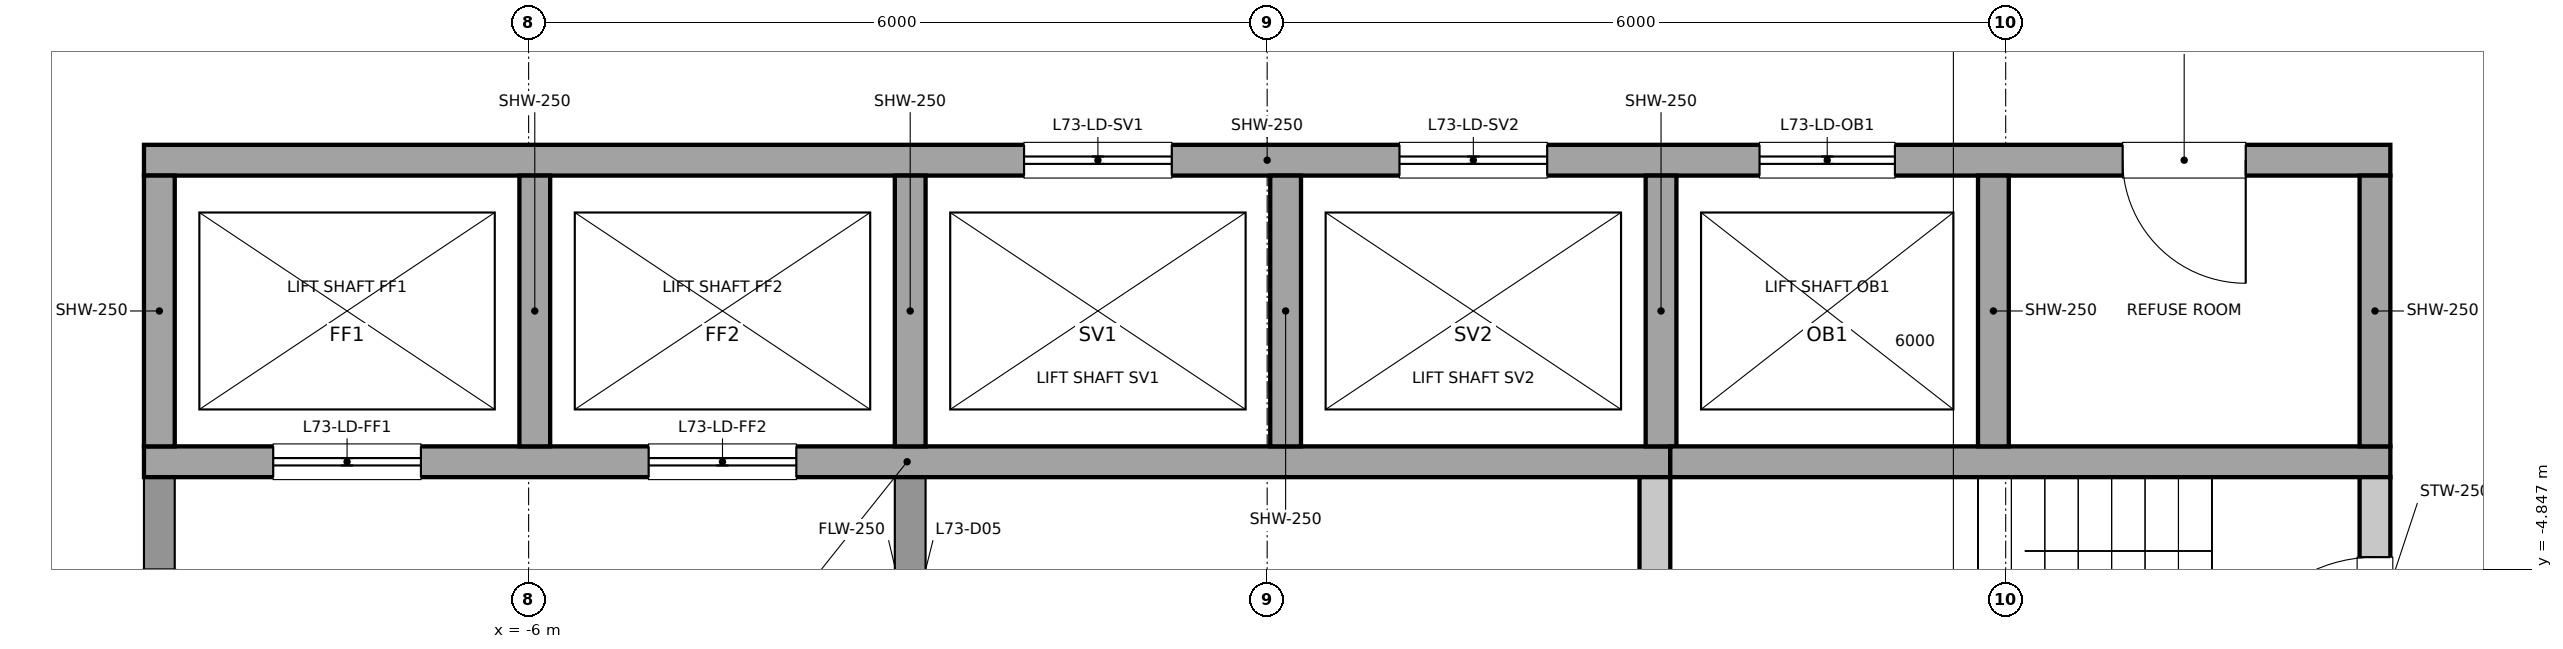
"""IFC4 building model, lengths in metres.
Left out: names, types, materials, properties, quantities, classifications, styles, units other than length and angle.
Written with IfcOpenShell. Run it as: python <this file> out.ifc"""

import sys

from ifc_helpers import new_model, si_unit, direction, frame, frame_2d, origin, place, context, subcontext, project, spatial, rectangle, extrude, element, fill, save


model = new_model("IFC4")
c1 = context("Model", 3, precision=1e-05, world=origin(), true_north=direction((0.0, 1.0)))
c2 = subcontext(c1, "Body", "Model", "MODEL_VIEW")
j1 = project(units=[si_unit("LENGTHUNIT", "METRE"), si_unit("PLANEANGLEUNIT", "RADIAN")], contexts=[c1])
p1 = place(None, origin())
s1 = spatial("IfcSite", under=j1, at=p1, CompositionType="ELEMENT")
p2 = place(p1, origin())
s2 = spatial("IfcBuilding", under=s1, at=p2, CompositionType="ELEMENT")
p3 = place(p2, frame((0.0, 0.0, 329.8)))
s3 = spatial("IfcBuildingStorey", under=s2, at=p3, CompositionType="ELEMENT", Elevation=329.8)
p4 = place(p3, frame((9.0, -6.6, 0.0), z_axis=(0.0, 0.0, 1.0), x_axis=(0.0, 1.0, 0.0)))
e1 = element("IfcWall", 1, at=p4, inside=s3, PredefinedType="SOLIDWALL", context=c2, shape_type="SweptSolid", body=[
    extrude(rectangle(XDim=2.5, YDim=0.25, at=frame_2d((1.25, 0.0))), origin(), (0.0, 0.0, 1.0), 5.8),
])
p5 = place(p4, frame((0.65, 0.0, 0.0)))
e2 = element("IfcOpeningElement", 2, at=p5, cuts=e1, PredefinedType="OPENING", context=c2, shape_type="SweptSolid", body=[
    extrude(rectangle(XDim=1.2, YDim=2.1, at=frame_2d((0.6, 1.05))), frame((0.0, 0.125, 0.0), z_axis=(0.0, -1.0, 0.0), x_axis=(1.0, 0.0, 0.0)), (0.0, 0.0, 1.0), 0.25),
])
p6 = place(p3, frame((-9.0, -6.6, 0.0), z_axis=(0.0, 0.0, 1.0), x_axis=(0.0, 1.0, 0.0)))
e3 = element("IfcWall", 3, at=p6, inside=s3, PredefinedType="PARTITIONING", context=c2, shape_type="SweptSolid", body=[
    extrude(rectangle(XDim=2.5, YDim=0.25, at=frame_2d((1.25, 0.0))), origin(), (0.0, 0.0, 1.0), 5.8),
])
p7 = place(p6, frame((0.75, 0.0, 0.0)))
e4 = element("IfcOpeningElement", 4, at=p7, cuts=e3, PredefinedType="OPENING", context=c2, shape_type="SweptSolid", body=[
    extrude(rectangle(XDim=1.0, YDim=2.1, at=frame_2d((0.5, 1.05))), frame((0.0, 0.125, 0.0), z_axis=(0.0, -1.0, 0.0), x_axis=(1.0, 0.0, 0.0)), (0.0, 0.0, 1.0), 0.25),
])
p8 = place(p3, frame((3.15, -6.6, 0.0), z_axis=(0.0, 0.0, 1.0), x_axis=(0.0, 1.0, 0.0)))
e5 = element("IfcWall", 5, at=p8, inside=s3, PredefinedType="SOLIDWALL", context=c2, shape_type="SweptSolid", body=[
    extrude(rectangle(XDim=2.5, YDim=0.25, at=frame_2d((1.25, 0.0))), origin(), (0.0, 0.0, 1.0), 5.8),
])
p9 = place(p3, frame((-2.9, -6.6, 0.0), z_axis=(0.0, 0.0, 1.0), x_axis=(0.0, 1.0, 0.0)))
e6 = element("IfcWall", 6, at=p9, inside=s3, PredefinedType="PARTITIONING", context=c2, shape_type="SweptSolid", body=[
    extrude(rectangle(XDim=2.5, YDim=0.25, at=frame_2d((1.25, 0.0))), origin(), (0.0, 0.0, 1.0), 5.8),
])
p10 = place(p9, frame((0.8, 0.0, 0.0)))
e7 = element("IfcOpeningElement", 7, at=p10, cuts=e6, PredefinedType="OPENING", context=c2, shape_type="SweptSolid", body=[
    extrude(rectangle(XDim=0.9, YDim=2.1, at=frame_2d((0.45, 1.05))), frame((0.0, 0.125, 0.0), z_axis=(0.0, -1.0, 0.0), x_axis=(1.0, 0.0, 0.0)), (0.0, 0.0, 1.0), 0.25),
])
p11 = place(p3, frame((-9.125, -1.525, 0.0), z_axis=(0.0, 0.0, 1.0), x_axis=(1.0, 0.0, 0.0)))
e8 = element("IfcWall", 8, at=p11, inside=s3, PredefinedType="SOLIDWALL", context=c2, shape_type="SweptSolid", body=[
    extrude(rectangle(XDim=18.25, YDim=0.25, at=frame_2d((9.125, 0.0))), origin(), (0.0, 0.0, 1.0), 5.8),
])
p12 = place(p11, frame((7.15, 0.0, 0.0)))
e9 = element("IfcOpeningElement", 9, at=p12, cuts=e8, PredefinedType="OPENING", context=c2, shape_type="SweptSolid", body=[
    extrude(rectangle(XDim=1.2, YDim=2.1, at=frame_2d((0.6, 1.05))), frame((0.0, 0.125, 0.0), z_axis=(0.0, -1.0, 0.0), x_axis=(1.0, 0.0, 0.0)), (0.0, 0.0, 1.0), 0.25),
])
p13 = place(p11, frame((10.2, 0.0, 0.0)))
e10 = element("IfcOpeningElement", 10, at=p13, cuts=e8, PredefinedType="OPENING", context=c2, shape_type="SweptSolid", body=[
    extrude(rectangle(XDim=1.2, YDim=2.1, at=frame_2d((0.6, 1.05))), frame((0.0, 0.125, 0.0), z_axis=(0.0, -1.0, 0.0), x_axis=(1.0, 0.0, 0.0)), (0.0, 0.0, 1.0), 0.25),
])
p14 = place(p11, frame((13.125, 0.0, 0.0)))
e11 = element("IfcOpeningElement", 11, at=p14, cuts=e8, PredefinedType="OPENING", context=c2, shape_type="SweptSolid", body=[
    extrude(rectangle(XDim=1.1, YDim=2.1, at=frame_2d((0.55, 1.05))), frame((0.0, 0.125, 0.0), z_axis=(0.0, -1.0, 0.0), x_axis=(1.0, 0.0, 0.0)), (0.0, 0.0, 1.0), 0.25),
])
p15 = place(p11, frame((16.075, 0.0, 0.0)))
e12 = element("IfcOpeningElement", 12, at=p15, cuts=e8, PredefinedType="OPENING", context=c2, shape_type="SweptSolid", body=[
    extrude(rectangle(XDim=1.0, YDim=2.1, at=frame_2d((0.5, 1.05))), frame((0.0, 0.125, 0.0), z_axis=(0.0, -1.0, 0.0), x_axis=(1.0, 0.0, 0.0)), (0.0, 0.0, 1.0), 0.25),
])
p16 = place(p3, frame((-9.125, -3.975, 0.0), z_axis=(0.0, 0.0, 1.0), x_axis=(1.0, 0.0, 0.0)))
e13 = element("IfcWall", 13, at=p16, inside=s3, PredefinedType="SOLIDWALL", context=c2, shape_type="SweptSolid", body=[
    extrude(rectangle(XDim=12.4, YDim=0.25, at=frame_2d((6.2, 0.0))), origin(), (0.0, 0.0, 1.0), 5.8),
])
p17 = place(p16, frame((1.05, 0.0, 0.0)))
e14 = element("IfcOpeningElement", 14, at=p17, cuts=e13, PredefinedType="OPENING", context=c2, shape_type="SweptSolid", body=[
    extrude(rectangle(XDim=1.2, YDim=2.1, at=frame_2d((0.6, 1.05))), frame((0.0, 0.125, 0.0), z_axis=(0.0, -1.0, 0.0), x_axis=(1.0, 0.0, 0.0)), (0.0, 0.0, 1.0), 0.25),
])
p18 = place(p16, frame((4.1, 0.0, 0.0)))
e15 = element("IfcOpeningElement", 15, at=p18, cuts=e13, PredefinedType="OPENING", context=c2, shape_type="SweptSolid", body=[
    extrude(rectangle(XDim=1.2, YDim=2.1, at=frame_2d((0.6, 1.05))), frame((0.0, 0.125, 0.0), z_axis=(0.0, -1.0, 0.0), x_axis=(1.0, 0.0, 0.0)), (0.0, 0.0, 1.0), 0.25),
])
p19 = place(p3, frame((3.275, -3.975, 0.0), z_axis=(0.0, 0.0, 1.0), x_axis=(1.0, 0.0, 0.0)))
e16 = element("IfcWall", 16, at=p19, inside=s3, PredefinedType="SOLIDWALL", context=c2, shape_type="SweptSolid", body=[
    extrude(rectangle(XDim=5.85, YDim=0.25, at=frame_2d((2.925, 0.0))), origin(), (0.0, 0.0, 1.0), 5.8),
])
for number, where, z_axis, x_axis in (
    (17, (-9.0, -3.85, 0.0), (0.0, 0.0, 1.0), (0.0, 1.0, 0.0)),
    (18, (-5.95, -3.85, 0.0), (0.0, 0.0, 1.0), (0.0, 1.0, 0.0)),
    (19, (-2.9, -3.85, 0.0), (0.0, 0.0, 1.0), (0.0, 1.0, 0.0)),
    (20, (0.15, -3.85, 0.0), (0.0, 0.0, 1.0), (0.0, 1.0, 0.0)),
    (21, (3.2, -3.85, 0.0), (0.0, 0.0, 1.0), (0.0, 1.0, 0.0)),
    (22, (5.9, -3.85, 0.0), (0.0, 0.0, 1.0), (0.0, 1.0, 0.0)),
    (23, (9.0, -3.85, 0.0), (0.0, 0.0, 1.0), (0.0, 1.0, 0.0)),
):
    element("IfcWall", number, at=place(p3, frame(where, z_axis=z_axis, x_axis=x_axis)), inside=s3, PredefinedType="SOLIDWALL", context=c2, shape_type="SweptSolid", body=[
        extrude(rectangle(XDim=2.2, YDim=0.25, at=frame_2d((1.1, 0.0))), origin(), (0.0, 0.0, 1.0), 5.8),
    ])
p20 = place(p17, origin())
e24 = element("IfcDoor", 24, at=p20, inside=s3, OperationType="DOUBLE_DOOR_SLIDING", PredefinedType="DOOR", context=c2, shape_type="SweptSolid", body=[
    extrude(rectangle(XDim=1.2, YDim=2.1, at=frame_2d((0.6, 1.05))), frame((0.0, 0.025, 0.0), z_axis=(0.0, -1.0, 0.0), x_axis=(1.0, 0.0, 0.0)), (0.0, 0.0, 1.0), 0.05),
])
fill(e14, e24)
p21 = place(p18, origin())
e25 = element("IfcDoor", 25, at=p21, inside=s3, OperationType="DOUBLE_DOOR_SLIDING", PredefinedType="DOOR", context=c2, shape_type="SweptSolid", body=[
    extrude(rectangle(XDim=1.2, YDim=2.1, at=frame_2d((0.6, 1.05))), frame((0.0, 0.025, 0.0), z_axis=(0.0, -1.0, 0.0), x_axis=(1.0, 0.0, 0.0)), (0.0, 0.0, 1.0), 0.05),
])
fill(e15, e25)
p22 = place(p12, origin())
e26 = element("IfcDoor", 26, at=p22, inside=s3, OperationType="DOUBLE_DOOR_SLIDING", PredefinedType="DOOR", context=c2, shape_type="SweptSolid", body=[
    extrude(rectangle(XDim=1.2, YDim=2.1, at=frame_2d((0.6, 1.05))), frame((0.0, 0.025, 0.0), z_axis=(0.0, -1.0, 0.0), x_axis=(1.0, 0.0, 0.0)), (0.0, 0.0, 1.0), 0.05),
])
fill(e9, e26)
p23 = place(p13, origin())
e27 = element("IfcDoor", 27, at=p23, inside=s3, OperationType="DOUBLE_DOOR_SLIDING", PredefinedType="DOOR", context=c2, shape_type="SweptSolid", body=[
    extrude(rectangle(XDim=1.2, YDim=2.1, at=frame_2d((0.6, 1.05))), frame((0.0, 0.025, 0.0), z_axis=(0.0, -1.0, 0.0), x_axis=(1.0, 0.0, 0.0)), (0.0, 0.0, 1.0), 0.05),
])
fill(e10, e27)
p24 = place(p14, origin())
e28 = element("IfcDoor", 28, at=p24, inside=s3, OperationType="DOUBLE_DOOR_SLIDING", PredefinedType="DOOR", context=c2, shape_type="SweptSolid", body=[
    extrude(rectangle(XDim=1.1, YDim=2.1, at=frame_2d((0.55, 1.05))), frame((0.0, 0.025, 0.0), z_axis=(0.0, -1.0, 0.0), x_axis=(1.0, 0.0, 0.0)), (0.0, 0.0, 1.0), 0.05),
])
fill(e11, e28)
p25 = place(p5, origin())
e29 = element("IfcDoor", 29, at=p25, inside=s3, OperationType="SINGLE_SWING_LEFT", PredefinedType="DOOR", context=c2, shape_type="SweptSolid", body=[
    extrude(rectangle(XDim=1.2, YDim=2.1, at=frame_2d((0.6, 1.05))), frame((0.0, 0.025, 0.0), z_axis=(0.0, -1.0, 0.0), x_axis=(1.0, 0.0, 0.0)), (0.0, 0.0, 1.0), 0.05),
])
fill(e2, e29)
p26 = place(p15, origin())
e30 = element("IfcDoor", 30, at=p26, inside=s3, OperationType="SINGLE_SWING_RIGHT", PredefinedType="DOOR", context=c2, shape_type="SweptSolid", body=[
    extrude(rectangle(XDim=1.0, YDim=2.1, at=frame_2d((0.5, 1.05))), frame((0.0, 0.025, 0.0), z_axis=(0.0, -1.0, 0.0), x_axis=(1.0, 0.0, 0.0)), (0.0, 0.0, 1.0), 0.05),
])
fill(e12, e30)
save(model, sys.argv[1])
